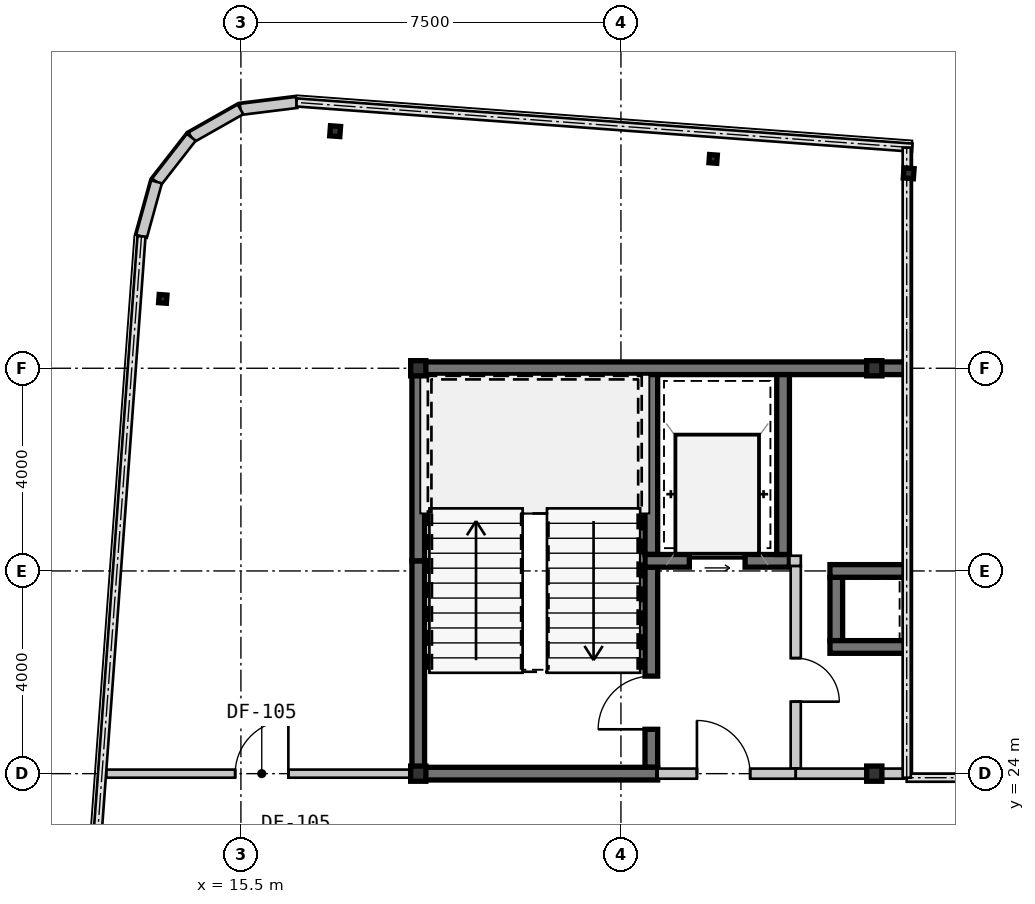
"""IFC4 building model, lengths in metres.
Left out: names, types, materials, properties, quantities, classifications, styles, units other than length and angle.
Written with IfcOpenShell. Run it as: python <this file> out.ifc"""

import sys

from ifc_helpers import new_model, si_unit, direction, frame, frame_2d, origin, origin_2d, place, context, subcontext, project, spatial, rectangle, hollow_rectangle, i_section, extrude, source, transform, mapped, element, fill, save


model = new_model("IFC4")
c1 = context("Model", 3, precision=1e-05, world=origin(), true_north=direction((0.0, 1.0)))
c2 = subcontext(c1, "Body", "Model", "MODEL_VIEW")
j1 = project(units=[si_unit("LENGTHUNIT", "METRE"), si_unit("PLANEANGLEUNIT", "RADIAN")], contexts=[c1])
p1 = place(None, origin())
s1 = spatial("IfcSite", under=j1, at=p1, CompositionType="ELEMENT")
p2 = place(p1, origin())
s2 = spatial("IfcBuilding", under=s1, at=p2, CompositionType="ELEMENT")
p3 = place(p2, frame((0.0, 0.0, 230.3)))
s3 = spatial("IfcBuildingStorey", under=s2, at=p3, CompositionType="ELEMENT", Elevation=230.3)
m1 = source(origin(), c2, "Body", "SweptSolid", [
    extrude(hollow_rectangle(XDim=0.3, YDim=0.3, WallThickness=0.012, at=origin_2d()), origin(), (0.0, 0.0, 1.0), 3.15),
])
for number, where, z_axis, x_axis in (
    (1, (19.0, 24.0, 0.0), (0.0, 0.0, 1.0), (1.0, 0.0, 0.0)),
    (2, (28.0, 24.0, 0.0), (0.0, 0.0, 1.0), (1.0, 0.0, 0.0)),
    (3, (19.0, 32.0, 0.0), (0.0, 0.0, 1.0), (1.0, 0.0, 0.0)),
    (4, (28.0, 32.0, 0.0), (0.0, 0.0, 1.0), (1.0, 0.0, 0.0)),
):
    element("IfcColumn", number, at=place(p3, frame(where, z_axis=z_axis, x_axis=x_axis)), inside=s3, PredefinedType="COLUMN", context=c2, shape_type="MappedRepresentation", body=[
        mapped(m1, transform((0.0, 0.0, 0.0), scale=1.0)),
    ])
m2 = source(origin(), c2, "Body", "SweptSolid", [
    extrude(hollow_rectangle(XDim=0.2, YDim=0.2, WallThickness=0.009, at=origin_2d()), origin(), (0.0, 0.0, 1.0), 3.15),
])
p4 = place(p3, frame((17.36, 36.679, 0.0), z_axis=(0.0, 0.0, 1.0), x_axis=(0.997314477224, -0.073238197128, 0.0)))
e5 = element("IfcColumn", 5, at=p4, inside=s3, PredefinedType="COLUMN", context=c2, shape_type="MappedRepresentation", body=[
    mapped(m2, transform((0.0, 0.0, 0.0), scale=1.0)),
])
m3 = source(origin(), c2, "Body", "SweptSolid", [
    extrude(i_section(OverallWidth=0.154, OverallDepth=0.162, WebThickness=0.008, FlangeThickness=0.011, at=origin_2d()), origin(), (0.0, 0.0, 1.0), 3.15),
])
for number, where, z_axis, x_axis in (
    (6, (24.82, 36.131, 0.0), (0.0, 0.0, 1.0), (0.997, -0.073, 0.0)),
    (7, (13.958, 33.369, 0.0), (0.0, 0.0, 1.0), (0.997, -0.073, 0.0)),
):
    element("IfcColumn", number, at=place(p3, frame(where, z_axis=z_axis, x_axis=x_axis)), inside=s3, PredefinedType="COLUMN", context=c2, shape_type="MappedRepresentation", body=[
        mapped(m3, transform((0.0, 0.0, 0.0), scale=1.0)),
    ])
p5 = place(p3, frame((28.679, 35.848, 0.0), z_axis=(0.0, 0.0, 1.0), x_axis=(0.997314477224, -0.073238197128, 0.0)))
e8 = element("IfcColumn", 8, at=p5, inside=s3, PredefinedType="COLUMN", context=c2, shape_type="MappedRepresentation", body=[
    mapped(m2, transform((0.0, 0.0, 0.0), scale=1.0)),
])
m4 = source(origin(), c2, "Body", "SweptSolid", [
    extrude(rectangle(XDim=1.116, YDim=0.22, at=frame_2d((0.558, 0.0))), origin(), (0.0, 0.0, 1.0), 2.93),
])
p6 = place(p3, frame((16.599, 37.246, 0.0), z_axis=(0.0, 0.0, 1.0), x_axis=(-0.992441899189, -0.122715429897, 0.0)))
e9 = element("IfcWall", 9, at=p6, inside=s3, PredefinedType="SOLIDWALL", context=c2, shape_type="MappedRepresentation", body=[
    mapped(m4, transform((0.0, 0.0, 0.0), scale=1.0)),
])
m5 = source(origin(), c2, "Body", "SweptSolid", [
    extrude(rectangle(XDim=1.116, YDim=0.22, at=frame_2d((0.558, 0.0))), origin(), (0.0, 0.0, 1.0), 2.93),
])
p7 = place(p3, frame((15.492, 37.109, 0.0), z_axis=(0.0, 0.0, 1.0), x_axis=(-0.869934579941, -0.493167138628, 0.0)))
e10 = element("IfcWall", 10, at=p7, inside=s3, PredefinedType="SOLIDWALL", context=c2, shape_type="MappedRepresentation", body=[
    mapped(m5, transform((0.0, 0.0, 0.0), scale=1.0)),
])
m6 = source(origin(), c2, "Body", "SweptSolid", [
    extrude(rectangle(XDim=1.116, YDim=0.22, at=frame_2d((0.558, 0.0))), origin(), (0.0, 0.0, 1.0), 2.93),
])
p8 = place(p3, frame((14.521, 36.559, 0.0), z_axis=(0.0, 0.0, 1.0), x_axis=(-0.614909386406, -0.788597772321, 0.0)))
e11 = element("IfcWall", 11, at=p8, inside=s3, PredefinedType="SOLIDWALL", context=c2, shape_type="MappedRepresentation", body=[
    mapped(m6, transform((0.0, 0.0, 0.0), scale=1.0)),
])
p9 = place(p3, frame((13.835, 35.679, 0.0), z_axis=(0.0, 0.0, 1.0), x_axis=(-0.266300605026, -0.963890028874, 0.0)))
e12 = element("IfcWall", 12, at=p9, inside=s3, PredefinedType="SOLIDWALL", context=c2, shape_type="MappedRepresentation", body=[
    mapped(m5, transform((0.0, 0.0, 0.0), scale=1.0)),
])
m7 = source(origin(), c2, "Body", "SweptSolid", [
    extrude(rectangle(XDim=9.125, YDim=0.25, at=frame_2d((4.562, 0.0))), origin(), (0.0, 0.0, 1.0), 2.93),
])
p10 = place(p3, frame((18.875, 32.0, 0.0), z_axis=(0.0, 0.0, 1.0), x_axis=(1.0, 0.0, 0.0)))
e13 = element("IfcWall", 13, at=p10, inside=s3, PredefinedType="SHEAR", context=c2, shape_type="MappedRepresentation", body=[
    mapped(m7, transform((0.0, 0.0, 0.0), scale=1.0)),
])
m8 = source(origin(), c2, "Body", "SweptSolid", [
    extrude(rectangle(XDim=0.64, YDim=0.25, at=frame_2d((0.32, 0.0))), origin(), (0.0, 0.0, 1.0), 2.93),
])
p11 = place(p3, frame((28.0, 32.0, 0.0), z_axis=(0.0, 0.0, 1.0), x_axis=(1.0, 0.0, 0.0)))
e14 = element("IfcWall", 14, at=p11, inside=s3, PredefinedType="SHEAR", context=c2, shape_type="MappedRepresentation", body=[
    mapped(m8, transform((0.0, 0.0, 0.0), scale=1.0)),
])
m9 = source(origin(), c2, "Body", "SweptSolid", [
    extrude(rectangle(XDim=4.075, YDim=0.25, at=frame_2d((2.038, 0.0))), origin(), (0.0, 0.0, 1.0), 2.93),
])
p12 = place(p3, frame((19.0, 24.125, 0.0), z_axis=(0.0, 0.0, 1.0), x_axis=(0.0, 1.0, 0.0)))
e15 = element("IfcWall", 15, at=p12, inside=s3, PredefinedType="SHEAR", context=c2, shape_type="MappedRepresentation", body=[
    mapped(m9, transform((0.0, 0.0, 0.0), scale=1.0)),
])
m10 = source(origin(), c2, "Body", "SweptSolid", [
    extrude(rectangle(XDim=3.675, YDim=0.25, at=frame_2d((1.837, 0.0))), origin(), (0.0, 0.0, 1.0), 2.93),
])
p13 = place(p3, frame((19.0, 28.2, 0.0), z_axis=(0.0, 0.0, 1.0), x_axis=(0.0, 1.0, 0.0)))
e16 = element("IfcWall", 16, at=p13, inside=s3, PredefinedType="SHEAR", context=c2, shape_type="MappedRepresentation", body=[
    mapped(m10, transform((0.0, 0.0, 0.0), scale=1.0)),
])
m11 = source(origin(), c2, "Body", "SweptSolid", [
    extrude(rectangle(XDim=3.55, YDim=0.25, at=frame_2d((1.775, 0.0))), origin(), (0.0, 0.0, 1.0), 2.93),
])
p14 = place(p3, frame((23.6, 28.325, 0.0), z_axis=(0.0, 0.0, 1.0), x_axis=(0.0, 1.0, 0.0)))
e17 = element("IfcWall", 17, at=p14, inside=s3, PredefinedType="SHEAR", context=c2, shape_type="MappedRepresentation", body=[
    mapped(m11, transform((0.0, 0.0, 0.0), scale=1.0)),
])
m12 = source(origin(), c2, "Body", "SweptSolid", [
    extrude(rectangle(XDim=3.95, YDim=0.25, at=frame_2d((1.975, 0.0))), origin(), (0.0, 0.0, 1.0), 2.93),
])
p15 = place(p3, frame((23.6, 24.125, 0.0), z_axis=(0.0, 0.0, 1.0), x_axis=(0.0, 1.0, 0.0)))
e18 = element("IfcWall", 18, at=p15, inside=s3, PredefinedType="SHEAR", context=c2, shape_type="MappedRepresentation", body=[
    mapped(m12, transform((0.0, 0.0, 0.0), scale=1.0)),
])
m13 = source(origin(), c2, "Body", "SweptSolid", [
    extrude(rectangle(XDim=1.05, YDim=2.1, at=frame_2d((0.525, 1.05))), frame((0.0, 0.135, 0.0), z_axis=(0.0, -1.0, 0.0), x_axis=(1.0, 0.0, 0.0)), (0.0, 0.0, 1.0), 0.27),
])
p16 = place(p15, frame((0.75, 0.0, 0.0)))
e19 = element("IfcOpeningElement", 19, at=p16, cuts=e18, PredefinedType="OPENING", context=c2, shape_type="MappedRepresentation", body=[
    mapped(m13, transform((0.0, 0.0, 0.0), scale=1.0)),
])
m14 = source(origin(), c2, "Body", "SweptSolid", [
    extrude(rectangle(XDim=4.85, YDim=0.25, at=frame_2d((2.425, 0.0))), origin(), (0.0, 0.0, 1.0), 2.93),
])
p17 = place(p3, frame((18.875, 24.0, 0.0), z_axis=(0.0, 0.0, 1.0), x_axis=(1.0, 0.0, 0.0)))
e20 = element("IfcWall", 20, at=p17, inside=s3, PredefinedType="SHEAR", context=c2, shape_type="MappedRepresentation", body=[
    mapped(m14, transform((0.0, 0.0, 0.0), scale=1.0)),
])
m15 = source(origin(), c2, "Body", "SweptSolid", [
    extrude(rectangle(XDim=2.85, YDim=0.25, at=frame_2d((1.425, 0.0))), origin(), (0.0, 0.0, 1.0), 2.93),
])
p18 = place(p3, frame((23.475, 28.2, 0.0), z_axis=(0.0, 0.0, 1.0), x_axis=(1.0, 0.0, 0.0)))
e21 = element("IfcWall", 21, at=p18, inside=s3, PredefinedType="SHEAR", context=c2, shape_type="MappedRepresentation", body=[
    mapped(m15, transform((0.0, 0.0, 0.0), scale=1.0)),
])
m16 = source(origin(), c2, "Body", "SweptSolid", [
    extrude(rectangle(XDim=1.1, YDim=2.15, at=frame_2d((0.55, 1.075))), frame((0.0, 0.135, 0.0), z_axis=(0.0, -1.0, 0.0), x_axis=(1.0, 0.0, 0.0)), (0.0, 0.0, 1.0), 0.27),
])
p19 = place(p18, frame((0.875, 0.0, 0.0)))
e22 = element("IfcOpeningElement", 22, at=p19, cuts=e21, PredefinedType="OPENING", context=c2, shape_type="MappedRepresentation", body=[
    mapped(m16, transform((0.0, 0.0, 0.0), scale=1.0)),
])
p20 = place(p3, frame((26.2, 28.325, 0.0), z_axis=(0.0, 0.0, 1.0), x_axis=(0.0, 1.0, 0.0)))
e23 = element("IfcWall", 23, at=p20, inside=s3, PredefinedType="SHEAR", context=c2, shape_type="MappedRepresentation", body=[
    mapped(m11, transform((0.0, 0.0, 0.0), scale=1.0)),
])
m17 = source(origin(), c2, "Body", "SweptSolid", [
    extrude(rectangle(XDim=4.0, YDim=0.2, at=frame_2d((2.0, 0.0))), origin(), (0.0, 0.0, 1.0), 2.93),
])
p21 = place(p3, frame((26.45, 24.1, 0.0), z_axis=(0.0, 0.0, 1.0), x_axis=(0.0, 1.0, 0.0)))
e24 = element("IfcWall", 24, at=p21, inside=s3, PredefinedType="SOLIDWALL", context=c2, shape_type="MappedRepresentation", body=[
    mapped(m17, transform((0.0, 0.0, 0.0), scale=1.0)),
])
m18 = source(origin(), c2, "Body", "SweptSolid", [
    extrude(rectangle(XDim=0.86, YDim=2.1, at=frame_2d((0.43, 1.05))), frame((0.0, 0.11, 0.0), z_axis=(0.0, -1.0, 0.0), x_axis=(1.0, 0.0, 0.0)), (0.0, 0.0, 1.0), 0.22),
])
p22 = place(p21, frame((1.32, 0.0, 0.0)))
e25 = element("IfcOpeningElement", 25, at=p22, cuts=e24, PredefinedType="OPENING", context=c2, shape_type="MappedRepresentation", body=[
    mapped(m18, transform((0.0, 0.0, 0.0), scale=1.0)),
])
m19 = source(origin(), c2, "Body", "SweptSolid", [
    extrude(rectangle(XDim=2.725, YDim=0.2, at=frame_2d((1.362, 0.0))), origin(), (0.0, 0.0, 1.0), 2.47),
])
p23 = place(p3, frame((23.725, 24.0, 0.0), z_axis=(0.0, 0.0, 1.0), x_axis=(1.0, 0.0, 0.0)))
e26 = element("IfcWall", 26, at=p23, inside=s3, PredefinedType="SOLIDWALL", context=c2, shape_type="MappedRepresentation", body=[
    mapped(m19, transform((0.0, 0.0, 0.0), scale=1.0)),
])
m20 = source(origin(), c2, "Body", "SweptSolid", [
    extrude(rectangle(XDim=1.05, YDim=2.1, at=frame_2d((0.525, 1.05))), frame((0.0, 0.11, 0.0), z_axis=(0.0, -1.0, 0.0), x_axis=(1.0, 0.0, 0.0)), (0.0, 0.0, 1.0), 0.22),
])
p24 = place(p23, frame((0.775, 0.0, 0.0)))
e27 = element("IfcOpeningElement", 27, at=p24, cuts=e26, PredefinedType="OPENING", context=c2, shape_type="MappedRepresentation", body=[
    mapped(m20, transform((0.0, 0.0, 0.0), scale=1.0)),
])
m21 = source(origin(), c2, "Body", "SweptSolid", [
    extrude(rectangle(XDim=1.25, YDim=0.25, at=frame_2d((0.625, 0.0))), origin(), (0.0, 0.0, 1.0), 2.93),
])
p25 = place(p3, frame((27.25, 27.875, 0.0), z_axis=(0.0, 0.0, 1.0), x_axis=(0.0, -1.0, 0.0)))
e28 = element("IfcWall", 28, at=p25, inside=s3, PredefinedType="SHEAR", context=c2, shape_type="MappedRepresentation", body=[
    mapped(m21, transform((0.0, 0.0, 0.0), scale=1.0)),
])
m22 = source(origin(), c2, "Body", "SweptSolid", [
    extrude(rectangle(XDim=1.515, YDim=0.25, at=frame_2d((0.757, 0.0))), origin(), (0.0, 0.0, 1.0), 2.93),
])
for number, where, z_axis, x_axis in (
    (29, (28.64, 28.0, 0.0), (0.0, 0.0, 1.0), (-1.0, 0.0, 0.0)),
    (30, (27.125, 26.5, 0.0), (0.0, 0.0, 1.0), (1.0, 0.0, 0.0)),
):
    element("IfcWall", number, at=place(p3, frame(where, z_axis=z_axis, x_axis=x_axis)), inside=s3, PredefinedType="SHEAR", context=c2, shape_type="MappedRepresentation", body=[
        mapped(m22, transform((0.0, 0.0, 0.0), scale=1.0)),
    ])
m23 = source(origin(), c2, "Body", "SweptSolid", [
    extrude(rectangle(XDim=0.594, YDim=0.2, at=frame_2d((0.297, 0.0))), origin(), (0.0, 0.0, 1.0), 2.23),
])
p26 = place(p3, frame((28.594, 24.0, 0.0), z_axis=(0.0, 0.0, 1.0), x_axis=(-1.0, 0.0, 0.0)))
e31 = element("IfcWall", 31, at=p26, inside=s3, PredefinedType="SOLIDWALL", context=c2, shape_type="MappedRepresentation", body=[
    mapped(m23, transform((0.0, 0.0, 0.0), scale=1.0)),
])
m24 = source(origin(), c2, "Body", "SweptSolid", [
    extrude(rectangle(XDim=1.55, YDim=0.2, at=frame_2d((0.775, 0.0))), origin(), (0.0, 0.0, 1.0), 2.47),
])
p27 = place(p3, frame((28.0, 24.0, 0.0), z_axis=(0.0, 0.0, 1.0), x_axis=(-1.0, 0.0, 0.0)))
e32 = element("IfcWall", 32, at=p27, inside=s3, PredefinedType="SOLIDWALL", context=c2, shape_type="MappedRepresentation", body=[
    mapped(m24, transform((0.0, 0.0, 0.0), scale=1.0)),
])
m25 = source(origin(), c2, "Body", "SweptSolid", [
    extrude(rectangle(XDim=6.032, YDim=0.16, at=frame_2d((3.016, 0.0))), origin(), (0.0, 0.0, 1.0), 2.93),
])
p28 = place(p3, frame((12.843, 24.0, 0.0), z_axis=(0.0, 0.0, 1.0), x_axis=(1.0, 0.0, 0.0)))
e33 = element("IfcWall", 33, at=p28, inside=s3, PredefinedType="PARTITIONING", context=c2, shape_type="MappedRepresentation", body=[
    mapped(m25, transform((0.0, 0.0, 0.0), scale=1.0)),
])
m26 = source(origin(), c2, "Body", "SweptSolid", [
    extrude(rectangle(XDim=1.05, YDim=2.1, at=frame_2d((0.525, 1.05))), frame((0.0, 0.09, 0.0), z_axis=(0.0, -1.0, 0.0), x_axis=(1.0, 0.0, 0.0)), (0.0, 0.0, 1.0), 0.18),
])
p29 = place(p28, frame((2.543, 0.0, 0.0)))
e34 = element("IfcOpeningElement", 34, at=p29, cuts=e33, PredefinedType="OPENING", context=c2, shape_type="MappedRepresentation", body=[
    mapped(m26, transform((0.0, 0.0, 0.0), scale=1.0)),
])
m27 = source(origin(), c2, "Body", "SweptSolid", [
    extrude(rectangle(XDim=0.225, YDim=0.2, at=frame_2d((0.113, 0.0))), origin(), (0.0, 0.0, 1.0), 2.93),
])
p30 = place(p3, frame((26.325, 28.2, 0.0), z_axis=(0.0, 0.0, 1.0), x_axis=(1.0, 0.0, 0.0)))
e35 = element("IfcWall", 35, at=p30, inside=s3, PredefinedType="SOLIDWALL", context=c2, shape_type="MappedRepresentation", body=[
    mapped(m27, transform((0.0, 0.0, 0.0), scale=1.0)),
])
m28 = source(origin(), c2, "Body", "SweptSolid", [
    extrude(rectangle(XDim=1.05, YDim=2.1, at=frame_2d((0.525, 1.05))), frame((0.0, 0.025, 0.0), z_axis=(0.0, -1.0, 0.0), x_axis=(1.0, 0.0, 0.0)), (0.0, 0.0, 1.0), 0.05),
])
p31 = place(p16, origin())
e36 = element("IfcDoor", 36, at=p31, inside=s3, OperationType="SINGLE_SWING_LEFT", PredefinedType="DOOR", context=c2, shape_type="MappedRepresentation", body=[
    mapped(m28, transform((0.0, 0.0, 0.0), scale=1.0)),
])
fill(e19, e36)
m29 = source(origin(), c2, "Body", "SweptSolid", [
    extrude(rectangle(XDim=1.1, YDim=2.15, at=frame_2d((0.55, 1.075))), frame((0.0, 0.025, 0.0), z_axis=(0.0, -1.0, 0.0), x_axis=(1.0, 0.0, 0.0)), (0.0, 0.0, 1.0), 0.05),
])
p32 = place(p19, origin())
e37 = element("IfcDoor", 37, at=p32, inside=s3, OperationType="SLIDING_TO_LEFT", PredefinedType="DOOR", context=c2, shape_type="MappedRepresentation", body=[
    mapped(m29, transform((0.0, 0.0, 0.0), scale=1.0)),
])
fill(e22, e37)
p33 = place(p24, origin())
e38 = element("IfcDoor", 38, at=p33, inside=s3, OperationType="SINGLE_SWING_LEFT", PredefinedType="DOOR", context=c2, shape_type="MappedRepresentation", body=[
    mapped(m28, transform((0.0, 0.0, 0.0), scale=1.0)),
])
fill(e27, e38)
p34 = place(p29, origin())
e39 = element("IfcDoor", 39, at=p34, inside=s3, OperationType="SINGLE_SWING_RIGHT", PredefinedType="DOOR", context=c2, shape_type="MappedRepresentation", body=[
    mapped(m28, transform((0.0, 0.0, 0.0), scale=1.0)),
])
fill(e34, e39)
m30 = source(origin(), c2, "Body", "SweptSolid", [
    extrude(rectangle(XDim=0.86, YDim=2.1, at=frame_2d((0.43, 1.05))), frame((0.0, 0.025, 0.0), z_axis=(0.0, -1.0, 0.0), x_axis=(1.0, 0.0, 0.0)), (0.0, 0.0, 1.0), 0.05),
])
p35 = place(p22, frame((0.86, 0.0, 0.0), z_axis=(0.0, 0.0, 1.0), x_axis=(-1.0, 0.0, 0.0)))
e40 = element("IfcDoor", 40, at=p35, inside=s3, OperationType="SINGLE_SWING_RIGHT", PredefinedType="DOOR", context=c2, shape_type="MappedRepresentation", body=[
    mapped(m30, transform((0.0, 0.0, 0.0), scale=1.0)),
])
fill(e25, e40)
save(model, sys.argv[1])
